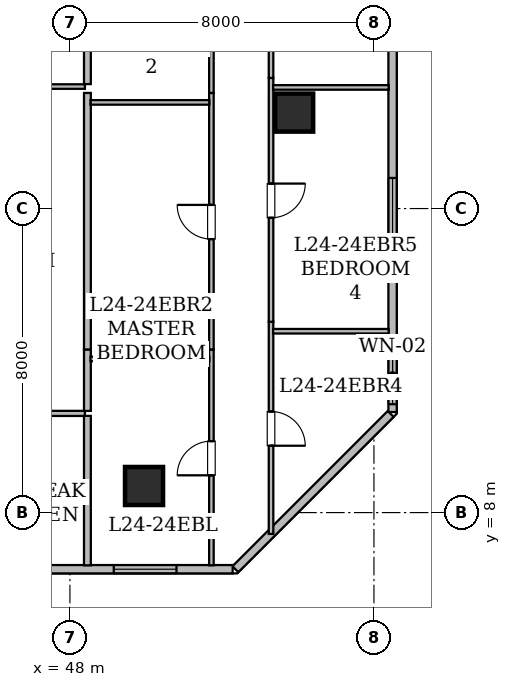
"""IFC4 building model, lengths in metres.
Left out: names, types, materials, properties, quantities, classifications, styles, units other than length and angle.
Written with IfcOpenShell. Run it as: python <this file> out.ifc"""

import sys

from ifc_helpers import new_model, si_unit, direction, frame, frame_2d, origin, origin_2d, place, context, subcontext, project, spatial, rectangle, hollow_rectangle, extrude, element, fill, save


model = new_model("IFC4")
c1 = context("Model", 3, precision=1e-05, world=origin(), true_north=direction((0.0, 1.0)))
c2 = subcontext(c1, "Body", "Model", "MODEL_VIEW")
j1 = project(units=[si_unit("LENGTHUNIT", "METRE"), si_unit("PLANEANGLEUNIT", "RADIAN")], contexts=[c1])
p1 = place(None, origin())
s1 = spatial("IfcSite", under=j1, at=p1, CompositionType="ELEMENT")
p2 = place(p1, origin())
s2 = spatial("IfcBuilding", under=s1, at=p2, CompositionType="ELEMENT")
p3 = place(p2, frame((0.0, 0.0, 98.25)))
s3 = spatial("IfcBuildingStorey", under=s2, at=p3, CompositionType="ELEMENT", Elevation=98.25)
for number, where, z_axis, x_axis in (
    (1, (49.95, 8.7, 0.0), (0.0, 0.0, 1.0), (1.0, 0.0, 0.0)),
    (2, (53.9, 18.525, 0.0), (0.0, 0.0, 1.0), (1.0, 0.0, 0.0)),
):
    element("IfcColumn", number, at=place(p3, frame(where, z_axis=z_axis, x_axis=x_axis)), inside=s3, PredefinedType="COLUMN", context=c2, shape_type="SweptSolid", body=[
        extrude(hollow_rectangle(XDim=1.0, YDim=1.0, WallThickness=0.05, at=origin_2d()), origin(), (0.0, 0.0, 1.0), 3.65),
    ])
p4 = place(p3, frame((56.49, 24.707, 0.0), z_axis=(0.0, 0.0, 1.0), x_axis=(0.0, -1.0, 0.0)))
e3 = element("IfcWall", 3, at=p4, inside=s3, PredefinedType="STANDARD", context=c2, shape_type="SweptSolid", body=[
    extrude(rectangle(XDim=14.061, YDim=0.22, at=frame_2d((7.031, 0.0))), origin(), (0.0, 0.0, 1.0), 3.43),
])
p5 = place(p4, frame((12.356, 0.0, 0.85)))
e4 = element("IfcOpeningElement", 4, at=p5, cuts=e3, PredefinedType="OPENING", context=c2, shape_type="SweptSolid", body=[
    extrude(rectangle(XDim=1.5, YDim=1.6, at=frame_2d((0.75, 0.8))), frame((0.0, 0.12, 0.0), z_axis=(0.0, -1.0, 0.0), x_axis=(1.0, 0.0, 0.0)), (0.0, 0.0, 1.0), 0.24),
])
p6 = place(p4, frame((7.902, 0.0, 0.85)))
e5 = element("IfcOpeningElement", 5, at=p6, cuts=e3, PredefinedType="OPENING", context=c2, shape_type="SweptSolid", body=[
    extrude(rectangle(XDim=1.65, YDim=1.55, at=frame_2d((0.825, 0.775))), frame((0.0, 0.12, 0.0), z_axis=(0.0, -1.0, 0.0), x_axis=(1.0, 0.0, 0.0)), (0.0, 0.0, 1.0), 0.24),
])
p7 = place(p4, frame((2.327, 0.0, 0.85)))
e6 = element("IfcOpeningElement", 6, at=p7, cuts=e3, PredefinedType="OPENING", context=c2, shape_type="SweptSolid", body=[
    extrude(rectangle(XDim=1.65, YDim=1.55, at=frame_2d((0.825, 0.775))), frame((0.0, 0.12, 0.0), z_axis=(0.0, -1.0, 0.0), x_axis=(1.0, 0.0, 0.0)), (0.0, 0.0, 1.0), 0.24),
])
p8 = place(p3, frame((56.44, 10.596, 0.0), z_axis=(0.0, 0.0, 1.0), x_axis=(-0.707106781187, -0.707106781187, 0.0)))
e7 = element("IfcWall", 7, at=p8, inside=s3, PredefinedType="STANDARD", context=c2, shape_type="SweptSolid", body=[
    extrude(rectangle(XDim=5.778, YDim=0.22, at=frame_2d((2.889, 0.0))), origin(), (0.0, 0.0, 1.0), 3.43),
])
p9 = place(p3, frame((52.283, 6.51, 0.0), z_axis=(0.0, 0.0, 1.0), x_axis=(-1.0, 0.0, 0.0)))
e8 = element("IfcWall", 8, at=p9, inside=s3, PredefinedType="STANDARD", context=c2, shape_type="SweptSolid", body=[
    extrude(rectangle(XDim=38.568, YDim=0.22, at=frame_2d((19.284, 0.0))), origin(), (0.0, 0.0, 1.0), 3.43),
])
p10 = place(p9, frame((21.108, 0.0, 0.85)))
e9 = element("IfcOpeningElement", 9, at=p10, cuts=e8, PredefinedType="OPENING", context=c2, shape_type="SweptSolid", body=[
    extrude(rectangle(XDim=1.65, YDim=1.55, at=frame_2d((0.825, 0.775))), frame((0.0, 0.12, 0.0), z_axis=(0.0, -1.0, 0.0), x_axis=(1.0, 0.0, 0.0)), (0.0, 0.0, 1.0), 0.24),
])
p11 = place(p9, frame((35.355, 0.0, 0.85)))
e10 = element("IfcOpeningElement", 10, at=p11, cuts=e8, PredefinedType="OPENING", context=c2, shape_type="SweptSolid", body=[
    extrude(rectangle(XDim=1.65, YDim=1.55, at=frame_2d((0.825, 0.775))), frame((0.0, 0.12, 0.0), z_axis=(0.0, -1.0, 0.0), x_axis=(1.0, 0.0, 0.0)), (0.0, 0.0, 1.0), 0.24),
])
p12 = place(p9, frame((29.413, 0.0, 0.8)))
e11 = element("IfcOpeningElement", 11, at=p12, cuts=e8, PredefinedType="OPENING", context=c2, shape_type="SweptSolid", body=[
    extrude(rectangle(XDim=1.2, YDim=1.5, at=frame_2d((0.6, 0.75))), frame((0.0, 0.12, 0.0), z_axis=(0.0, -1.0, 0.0), x_axis=(1.0, 0.0, 0.0)), (0.0, 0.0, 1.0), 0.24),
])
p13 = place(p9, frame((31.863, 0.0, 0.85)))
e12 = element("IfcOpeningElement", 12, at=p13, cuts=e8, PredefinedType="OPENING", context=c2, shape_type="SweptSolid", body=[
    extrude(rectangle(XDim=1.65, YDim=1.55, at=frame_2d((0.825, 0.775))), frame((0.0, 0.12, 0.0), z_axis=(0.0, -1.0, 0.0), x_axis=(1.0, 0.0, 0.0)), (0.0, 0.0, 1.0), 0.24),
])
p14 = place(p9, frame((26.513, 0.0, 0.85)))
e13 = element("IfcOpeningElement", 13, at=p14, cuts=e8, PredefinedType="OPENING", context=c2, shape_type="SweptSolid", body=[
    extrude(rectangle(XDim=1.65, YDim=1.55, at=frame_2d((0.825, 0.775))), frame((0.0, 0.12, 0.0), z_axis=(0.0, -1.0, 0.0), x_axis=(1.0, 0.0, 0.0)), (0.0, 0.0, 1.0), 0.24),
])
p15 = place(p9, frame((13.843, 0.0, 0.85)))
e14 = element("IfcOpeningElement", 14, at=p15, cuts=e8, PredefinedType="OPENING", context=c2, shape_type="SweptSolid", body=[
    extrude(rectangle(XDim=1.65, YDim=1.55, at=frame_2d((0.825, 0.775))), frame((0.0, 0.12, 0.0), z_axis=(0.0, -1.0, 0.0), x_axis=(1.0, 0.0, 0.0)), (0.0, 0.0, 1.0), 0.24),
])
p16 = place(p9, frame((1.479, 0.0, 0.85)))
e15 = element("IfcOpeningElement", 15, at=p16, cuts=e8, PredefinedType="OPENING", context=c2, shape_type="SweptSolid", body=[
    extrude(rectangle(XDim=1.65, YDim=1.55, at=frame_2d((0.825, 0.775))), frame((0.0, 0.12, 0.0), z_axis=(0.0, -1.0, 0.0), x_axis=(1.0, 0.0, 0.0)), (0.0, 0.0, 1.0), 0.24),
])
p17 = place(p3, frame((44.803, 19.21, 0.0), z_axis=(0.0, 0.0, 1.0), x_axis=(1.0, 0.0, 0.0)))
e16 = element("IfcWall", 16, at=p17, inside=s3, PredefinedType="PARTITIONING", context=c2, shape_type="SweptSolid", body=[
    extrude(rectangle(XDim=3.592, YDim=0.12, at=frame_2d((1.796, 0.0))), origin(), (0.0, 0.0, 1.0), 2.647),
])
p18 = place(p17, frame((0.397, 0.0, 0.0)))
e17 = element("IfcOpeningElement", 17, at=p18, cuts=e16, PredefinedType="OPENING", context=c2, shape_type="SweptSolid", body=[
    extrude(rectangle(XDim=0.9, YDim=2.1, at=frame_2d((0.45, 1.05))), frame((0.0, 0.07, 0.0), z_axis=(0.0, -1.0, 0.0), x_axis=(1.0, 0.0, 0.0)), (0.0, 0.0, 1.0), 0.14),
])
p19 = place(p3, frame((48.395, 10.61, 0.0), z_axis=(0.0, 0.0, 1.0), x_axis=(-1.0, 0.0, 0.0)))
e18 = element("IfcWall", 18, at=p19, inside=s3, PredefinedType="PARTITIONING", context=c2, shape_type="SweptSolid", body=[
    extrude(rectangle(XDim=4.166, YDim=0.135, at=frame_2d((2.083, 0.0))), origin(), (0.0, 0.0, 1.0), 3.43),
])
p20 = place(p19, frame((1.658, 0.0, 0.0)))
e19 = element("IfcOpeningElement", 19, at=p20, cuts=e18, PredefinedType="OPENING", context=c2, shape_type="SweptSolid", body=[
    extrude(rectangle(XDim=0.85, YDim=2.1, at=frame_2d((0.425, 1.05))), frame((0.0, 0.077, 0.0), z_axis=(0.0, -1.0, 0.0), x_axis=(1.0, 0.0, 0.0)), (0.0, 0.0, 1.0), 0.155),
])
p21 = place(p3, frame((48.46, 12.292, 0.0), z_axis=(0.0, 0.0, 1.0), x_axis=(0.0, -1.0, 0.0)))
e20 = element("IfcWall", 20, at=p21, inside=s3, PredefinedType="STANDARD", context=c2, shape_type="SweptSolid", body=[
    extrude(rectangle(XDim=1.617, YDim=0.18, at=frame_2d((0.809, 0.0))), origin(), (0.0, 0.0, 1.0), 2.647),
])
p22 = place(p3, frame((48.46, 19.042, 0.0), z_axis=(0.0, 0.0, 1.0), x_axis=(0.0, -1.0, 0.0)))
e21 = element("IfcWall", 21, at=p22, inside=s3, PredefinedType="STANDARD", context=c2, shape_type="SweptSolid", body=[
    extrude(rectangle(XDim=6.75, YDim=0.18, at=frame_2d((3.375, 0.0))), origin(), (0.0, 0.0, 1.0), 2.647),
])
p23 = place(p3, frame((48.46, 26.576, 0.0), z_axis=(0.0, 0.0, 1.0), x_axis=(0.0, -1.0, 0.0)))
e22 = element("IfcWall", 22, at=p23, inside=s3, PredefinedType="STANDARD", context=c2, shape_type="SweptSolid", body=[
    extrude(rectangle(XDim=7.301, YDim=0.18, at=frame_2d((3.65, 0.0))), origin(), (0.0, 0.0, 1.0), 2.687),
])
p24 = place(p3, frame((48.46, 10.545, 0.0), z_axis=(0.0, 0.0, 1.0), x_axis=(0.0, -1.0, 0.0)))
e23 = element("IfcWall", 23, at=p24, inside=s3, PredefinedType="STANDARD", context=c2, shape_type="SweptSolid", body=[
    extrude(rectangle(XDim=3.933, YDim=0.18, at=frame_2d((1.966, 0.0))), origin(), (0.0, 0.0, 1.0), 2.876),
])
p25 = place(p3, frame((51.723, 6.612, 0.0), z_axis=(0.0, 0.0, 1.0), x_axis=(0.0, 1.0, 0.0)))
e24 = element("IfcWall", 24, at=p25, inside=s3, PredefinedType="PARTITIONING", context=c2, shape_type="SweptSolid", body=[
    extrude(rectangle(XDim=5.68, YDim=0.12, at=frame_2d((2.84, 0.0))), origin(), (0.0, 0.0, 1.0), 3.43),
])
p26 = place(p25, frame((2.369, 0.0, 0.0)))
e25 = element("IfcOpeningElement", 25, at=p26, cuts=e24, PredefinedType="OPENING", context=c2, shape_type="SweptSolid", body=[
    extrude(rectangle(XDim=0.9, YDim=2.1, at=frame_2d((0.45, 1.05))), frame((0.0, 0.07, 0.0), z_axis=(0.0, -1.0, 0.0), x_axis=(1.0, 0.0, 0.0)), (0.0, 0.0, 1.0), 0.14),
])
p27 = place(p3, frame((51.723, 12.292, 0.0), z_axis=(0.0, 0.0, 1.0), x_axis=(0.0, 1.0, 0.0)))
e26 = element("IfcWall", 26, at=p27, inside=s3, PredefinedType="PARTITIONING", context=c2, shape_type="SweptSolid", body=[
    extrude(rectangle(XDim=6.75, YDim=0.12, at=frame_2d((3.375, 0.0))), origin(), (0.0, 0.0, 1.0), 2.687),
])
p28 = place(p27, frame((2.904, 0.0, 0.0)))
e27 = element("IfcOpeningElement", 27, at=p28, cuts=e26, PredefinedType="OPENING", context=c2, shape_type="SweptSolid", body=[
    extrude(rectangle(XDim=0.9, YDim=2.1, at=frame_2d((0.45, 1.05))), frame((0.0, 0.07, 0.0), z_axis=(0.0, -1.0, 0.0), x_axis=(1.0, 0.0, 0.0)), (0.0, 0.0, 1.0), 0.14),
])
p29 = place(p3, frame((51.723, 19.042, 0.0), z_axis=(0.0, 0.0, 1.0), x_axis=(0.0, 1.0, 0.0)))
e28 = element("IfcWall", 28, at=p29, inside=s3, PredefinedType="PARTITIONING", context=c2, shape_type="SweptSolid", body=[
    extrude(rectangle(XDim=7.848, YDim=0.12, at=frame_2d((3.924, 0.0))), origin(), (0.0, 0.0, 1.0), 2.687),
])
p30 = place(p29, frame((3.474, 0.0, 0.0)))
e29 = element("IfcOpeningElement", 29, at=p30, cuts=e28, PredefinedType="OPENING", context=c2, shape_type="SweptSolid", body=[
    extrude(rectangle(XDim=0.9, YDim=2.1, at=frame_2d((0.45, 1.05))), frame((0.0, 0.07, 0.0), z_axis=(0.0, -1.0, 0.0), x_axis=(1.0, 0.0, 0.0)), (0.0, 0.0, 1.0), 0.14),
])
p31 = place(p3, frame((53.292, 13.021, 0.0), z_axis=(0.0, 0.0, 1.0), x_axis=(0.0, -1.0, 0.0)))
e30 = element("IfcWall", 30, at=p31, inside=s3, PredefinedType="PARTITIONING", context=c2, shape_type="SweptSolid", body=[
    extrude(rectangle(XDim=5.582, YDim=0.12, at=frame_2d((2.791, 0.0))), origin(), (0.0, 0.0, 1.0), 3.43),
])
p32 = place(p31, frame((2.362, 0.0, 0.0)))
e31 = element("IfcOpeningElement", 31, at=p32, cuts=e30, PredefinedType="OPENING", context=c2, shape_type="SweptSolid", body=[
    extrude(rectangle(XDim=0.9, YDim=2.1, at=frame_2d((0.45, 1.05))), frame((0.0, 0.07, 0.0), z_axis=(0.0, -1.0, 0.0), x_axis=(1.0, 0.0, 0.0)), (0.0, 0.0, 1.0), 0.14),
])
p33 = place(p3, frame((53.292, 19.437, 0.0), z_axis=(0.0, 0.0, 1.0), x_axis=(0.0, -1.0, 0.0)))
e32 = element("IfcWall", 32, at=p33, inside=s3, PredefinedType="PARTITIONING", context=c2, shape_type="SweptSolid", body=[
    extrude(rectangle(XDim=6.416, YDim=0.12, at=frame_2d((3.208, 0.0))), origin(), (0.0, 0.0, 1.0), 2.687),
])
p34 = place(p33, frame((2.78, 0.0, 0.0)))
e33 = element("IfcOpeningElement", 33, at=p34, cuts=e32, PredefinedType="OPENING", context=c2, shape_type="SweptSolid", body=[
    extrude(rectangle(XDim=0.9, YDim=2.1, at=frame_2d((0.45, 1.05))), frame((0.0, 0.07, 0.0), z_axis=(0.0, -1.0, 0.0), x_axis=(1.0, 0.0, 0.0)), (0.0, 0.0, 1.0), 0.14),
])
p35 = place(p3, frame((53.292, 29.49, 0.0), z_axis=(0.0, 0.0, 1.0), x_axis=(0.0, -1.0, 0.0)))
e34 = element("IfcWall", 34, at=p35, inside=s3, PredefinedType="PARTITIONING", context=c2, shape_type="SweptSolid", body=[
    extrude(rectangle(XDim=10.053, YDim=0.12, at=frame_2d((5.026, 0.0))), origin(), (0.0, 0.0, 1.0), 2.687),
])
p36 = place(p35, frame((5.806, 0.0, 0.0)))
e35 = element("IfcOpeningElement", 35, at=p36, cuts=e34, PredefinedType="OPENING", context=c2, shape_type="SweptSolid", body=[
    extrude(rectangle(XDim=0.9, YDim=2.1, at=frame_2d((0.45, 1.05))), frame((0.0, 0.07, 0.0), z_axis=(0.0, -1.0, 0.0), x_axis=(1.0, 0.0, 0.0)), (0.0, 0.0, 1.0), 0.14),
])
p37 = place(p3, frame((48.542, 12.043, 0.0), z_axis=(0.0, 0.0, 1.0), x_axis=(1.0, 0.0, 0.0)))
e36 = element("IfcWall", 36, at=p37, inside=s3, PredefinedType="PARTITIONING", context=c2, shape_type="SweptSolid", body=[
    extrude(rectangle(XDim=3.127, YDim=0.12, at=frame_2d((1.563, 0.0))), origin(), (0.0, 0.0, 1.0), 2.647),
])
p38 = place(p3, frame((48.542, 18.793, 0.0), z_axis=(0.0, 0.0, 1.0), x_axis=(1.0, 0.0, 0.0)))
e37 = element("IfcWall", 37, at=p38, inside=s3, PredefinedType="PARTITIONING", context=c2, shape_type="SweptSolid", body=[
    extrude(rectangle(XDim=3.127, YDim=0.12, at=frame_2d((1.563, 0.0))), origin(), (0.0, 0.0, 1.0), 2.687),
])
p39 = place(p3, frame((53.346, 12.772, 0.0), z_axis=(0.0, 0.0, 1.0), x_axis=(1.0, 0.0, 0.0)))
e38 = element("IfcWall", 38, at=p39, inside=s3, PredefinedType="PARTITIONING", context=c2, shape_type="SweptSolid", body=[
    extrude(rectangle(XDim=3.042, YDim=0.12, at=frame_2d((1.521, 0.0))), origin(), (0.0, 0.0, 1.0), 3.43),
])
p40 = place(p3, frame((53.346, 19.187, 0.0), z_axis=(0.0, 0.0, 1.0), x_axis=(1.0, 0.0, 0.0)))
e39 = element("IfcWall", 39, at=p40, inside=s3, PredefinedType="PARTITIONING", context=c2, shape_type="SweptSolid", body=[
    extrude(rectangle(XDim=3.042, YDim=0.12, at=frame_2d((1.521, 0.0))), origin(), (0.0, 0.0, 1.0), 2.876),
])
p41 = place(p16, origin())
e40 = element("IfcWindow", 40, at=p41, inside=s3, PartitioningType="SINGLE_PANEL", PredefinedType="WINDOW", context=c2, shape_type="SweptSolid", body=[
    extrude(rectangle(XDim=1.65, YDim=1.55, at=frame_2d((0.825, 0.775))), frame((0.0, 0.03, 0.0), z_axis=(0.0, -1.0, 0.0), x_axis=(1.0, 0.0, 0.0)), (0.0, 0.0, 1.0), 0.06),
])
fill(e15, e40)
p42 = place(p5, origin())
e41 = element("IfcWindow", 41, at=p42, inside=s3, PartitioningType="SINGLE_PANEL", PredefinedType="WINDOW", context=c2, shape_type="SweptSolid", body=[
    extrude(rectangle(XDim=1.5, YDim=1.6, at=frame_2d((0.75, 0.8))), frame((0.0, 0.03, 0.0), z_axis=(0.0, -1.0, 0.0), x_axis=(1.0, 0.0, 0.0)), (0.0, 0.0, 1.0), 0.06),
])
fill(e4, e41)
p43 = place(p6, origin())
e42 = element("IfcWindow", 42, at=p43, inside=s3, PartitioningType="SINGLE_PANEL", PredefinedType="WINDOW", context=c2, shape_type="SweptSolid", body=[
    extrude(rectangle(XDim=1.65, YDim=1.55, at=frame_2d((0.825, 0.775))), frame((0.0, 0.03, 0.0), z_axis=(0.0, -1.0, 0.0), x_axis=(1.0, 0.0, 0.0)), (0.0, 0.0, 1.0), 0.06),
])
fill(e5, e42)
p44 = place(p26, origin())
e43 = element("IfcDoor", 43, at=p44, inside=s3, OperationType="SINGLE_SWING_LEFT", PredefinedType="DOOR", context=c2, shape_type="SweptSolid", body=[
    extrude(rectangle(XDim=0.9, YDim=2.1, at=frame_2d((0.45, 1.05))), frame((0.0, 0.025, 0.0), z_axis=(0.0, -1.0, 0.0), x_axis=(1.0, 0.0, 0.0)), (0.0, 0.0, 1.0), 0.05),
])
fill(e25, e43)
p45 = place(p28, origin())
e44 = element("IfcDoor", 44, at=p45, inside=s3, OperationType="SINGLE_SWING_RIGHT", PredefinedType="DOOR", context=c2, shape_type="SweptSolid", body=[
    extrude(rectangle(XDim=0.9, YDim=2.1, at=frame_2d((0.45, 1.05))), frame((0.0, 0.025, 0.0), z_axis=(0.0, -1.0, 0.0), x_axis=(1.0, 0.0, 0.0)), (0.0, 0.0, 1.0), 0.05),
])
fill(e27, e44)
p46 = place(p32, origin())
e45 = element("IfcDoor", 45, at=p46, inside=s3, OperationType="SINGLE_SWING_RIGHT", PredefinedType="DOOR", context=c2, shape_type="SweptSolid", body=[
    extrude(rectangle(XDim=0.9, YDim=2.1, at=frame_2d((0.45, 1.05))), frame((0.0, 0.025, 0.0), z_axis=(0.0, -1.0, 0.0), x_axis=(1.0, 0.0, 0.0)), (0.0, 0.0, 1.0), 0.05),
])
fill(e31, e45)
p47 = place(p34, origin())
e46 = element("IfcDoor", 46, at=p47, inside=s3, OperationType="SINGLE_SWING_LEFT", PredefinedType="DOOR", context=c2, shape_type="SweptSolid", body=[
    extrude(rectangle(XDim=0.9, YDim=2.1, at=frame_2d((0.45, 1.05))), frame((0.0, 0.025, 0.0), z_axis=(0.0, -1.0, 0.0), x_axis=(1.0, 0.0, 0.0)), (0.0, 0.0, 1.0), 0.05),
])
fill(e33, e46)
save(model, sys.argv[1])
